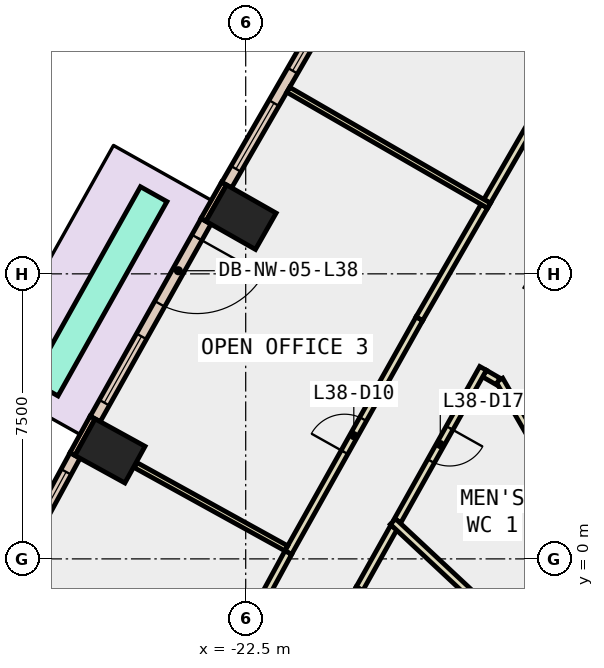
"""IFC4 building model, lengths in metres.
Left out: names, types, materials, properties, quantities, classifications, styles, units other than length and angle.
Written with IfcOpenShell. Run it as: python <this file> out.ifc"""

import sys

from ifc_helpers import new_model, si_unit, direction, frame, frame_2d, origin, origin_2d, place, context, subcontext, project, spatial, rectangle, extrude, element, fill, save


model = new_model("IFC4")
c1 = context("Model", 3, precision=1e-05, world=origin(), true_north=direction((0.0, 1.0)))
c2 = subcontext(c1, "Body", "Model", "MODEL_VIEW")
j1 = project(units=[si_unit("LENGTHUNIT", "METRE"), si_unit("PLANEANGLEUNIT", "RADIAN")], contexts=[c1])
p1 = place(None, origin())
s1 = spatial("IfcSite", under=j1, at=p1, CompositionType="ELEMENT")
p2 = place(p1, origin())
s2 = spatial("IfcBuilding", under=s1, at=p2, CompositionType="ELEMENT")
p3 = place(p2, frame((0.0, 0.0, 171.8)))
s3 = spatial("IfcBuildingStorey", under=s2, at=p3, CompositionType="ELEMENT", Elevation=171.8)
for number, where, z_axis, x_axis in (
    (1, (-22.623, 8.991, -0.4), (0.0, 0.0, 1.0), (0.494, 0.869, 0.0)),
    (2, (-26.071, 2.841, -0.4), (0.0, 0.0, 1.0), (0.482, 0.876, 0.0)),
):
    element("IfcColumn", number, at=place(p3, frame(where, z_axis=z_axis, x_axis=x_axis)), inside=s3, PredefinedType="COLUMN", context=c2, shape_type="SweptSolid", body=[
        extrude(rectangle(XDim=1.1, YDim=1.5, at=origin_2d()), origin(), (0.0, 0.0, 1.0), 4.2),
    ])
p4 = place(p3, frame((-23.069, 9.877, 0.0), z_axis=(0.0, 0.0, 1.0), x_axis=(-0.494512685492, -0.869170411305, 0.0)))
e3 = element("IfcWall", 3, at=p4, inside=s3, PredefinedType="STANDARD", context=c2, shape_type="SweptSolid", body=[
    extrude(rectangle(XDim=1.1, YDim=0.15, at=frame_2d((0.55, 0.0))), origin(), (0.0, 0.0, 1.0), 3.8),
])
p5 = place(p3, frame((-26.529, 3.721, 0.0), z_axis=(0.0, 0.0, 1.0), x_axis=(-0.481850587491, -0.876253394478, 0.0)))
e4 = element("IfcWall", 4, at=p5, inside=s3, PredefinedType="STANDARD", context=c2, shape_type="SweptSolid", body=[
    extrude(rectangle(XDim=1.1, YDim=0.15, at=frame_2d((0.55, 0.0))), origin(), (0.0, 0.0, 1.0), 3.8),
])
p6 = place(p3, frame((-20.02, 15.002, 0.0), z_axis=(0.0, 0.0, 1.0), x_axis=(-0.49986421087, -0.866103787482, 0.0)))
e5 = element("IfcWall", 5, at=p6, inside=s3, PredefinedType="STANDARD", context=c2, shape_type="SweptSolid", body=[
    extrude(rectangle(XDim=5.964, YDim=0.3, at=frame_2d((2.982, 0.0))), origin(), (0.0, 0.0, 1.0), 3.8),
])
p7 = place(p6, frame((0.491, 0.0, 0.9)))
e6 = element("IfcOpeningElement", 6, at=p7, cuts=e5, PredefinedType="OPENING", context=c2, shape_type="SweptSolid", body=[
    extrude(rectangle(XDim=2.0, YDim=2.6, at=frame_2d((1.0, 1.3))), frame((0.0, 0.16, 0.0), z_axis=(0.0, -1.0, 0.0), x_axis=(1.0, 0.0, 0.0)), (0.0, 0.0, 1.0), 0.32),
])
p8 = place(p6, frame((3.473, 0.0, 0.9)))
e7 = element("IfcOpeningElement", 7, at=p8, cuts=e5, PredefinedType="OPENING", context=c2, shape_type="SweptSolid", body=[
    extrude(rectangle(XDim=2.0, YDim=2.6, at=frame_2d((1.0, 1.3))), frame((0.0, 0.16, 0.0), z_axis=(0.0, -1.0, 0.0), x_axis=(1.0, 0.0, 0.0)), (0.0, 0.0, 1.0), 0.32),
])
p9 = place(p3, frame((-23.544, 8.883, 0.0), z_axis=(0.0, 0.0, 1.0), x_axis=(-0.489032196971, -0.87226573378, 0.0)))
e8 = element("IfcWall", 8, at=p9, inside=s3, PredefinedType="STANDARD", context=c2, shape_type="SweptSolid", body=[
    extrude(rectangle(XDim=5.963, YDim=0.3, at=frame_2d((2.981, 0.0))), origin(), (0.0, 0.0, 1.0), 3.8),
])
p10 = place(p9, frame((0.491, 0.0, 0.0)))
e9 = element("IfcOpeningElement", 9, at=p10, cuts=e8, PredefinedType="OPENING", context=c2, shape_type="SweptSolid", body=[
    extrude(rectangle(XDim=2.0, YDim=2.4, at=frame_2d((1.0, 1.2))), frame((0.0, 0.16, 0.0), z_axis=(0.0, -1.0, 0.0), x_axis=(1.0, 0.0, 0.0)), (0.0, 0.0, 1.0), 0.32),
])
p11 = place(p9, frame((3.472, 0.0, 0.9)))
e10 = element("IfcOpeningElement", 10, at=p11, cuts=e8, PredefinedType="OPENING", context=c2, shape_type="SweptSolid", body=[
    extrude(rectangle(XDim=2.0, YDim=2.6, at=frame_2d((1.0, 1.3))), frame((0.0, 0.16, 0.0), z_axis=(0.0, -1.0, 0.0), x_axis=(1.0, 0.0, 0.0)), (0.0, 0.0, 1.0), 0.32),
])
p12 = place(p3, frame((-26.991, 2.72, 0.0), z_axis=(0.0, 0.0, 1.0), x_axis=(-0.477555226268, -0.878601733361, 0.0)))
e11 = element("IfcWall", 11, at=p12, inside=s3, PredefinedType="STANDARD", context=c2, shape_type="SweptSolid", body=[
    extrude(rectangle(XDim=5.964, YDim=0.3, at=frame_2d((2.982, 0.0))), origin(), (0.0, 0.0, 1.0), 3.8),
])
p13 = place(p12, frame((0.491, 0.0, 0.9)))
e12 = element("IfcOpeningElement", 12, at=p13, cuts=e11, PredefinedType="OPENING", context=c2, shape_type="SweptSolid", body=[
    extrude(rectangle(XDim=2.0, YDim=2.6, at=frame_2d((1.0, 1.3))), frame((0.0, 0.16, 0.0), z_axis=(0.0, -1.0, 0.0), x_axis=(1.0, 0.0, 0.0)), (0.0, 0.0, 1.0), 0.32),
])
p14 = place(p12, frame((3.473, 0.0, 0.9)))
e13 = element("IfcOpeningElement", 13, at=p14, cuts=e11, PredefinedType="OPENING", context=c2, shape_type="SweptSolid", body=[
    extrude(rectangle(XDim=2.0, YDim=2.6, at=frame_2d((1.0, 1.3))), frame((0.0, 0.16, 0.0), z_axis=(0.0, -1.0, 0.0), x_axis=(1.0, 0.0, 0.0)), (0.0, 0.0, 1.0), 0.32),
])
p15 = place(p3, frame((-24.921, 9.597, 0.0), z_axis=(0.0, 0.0, 1.0), x_axis=(-0.489036967821, -0.872263059005, 0.0)))
e14 = element("IfcWall", 14, at=p15, inside=s3, PredefinedType="STANDARD", context=c2, shape_type="SweptSolid", body=[
    extrude(rectangle(XDim=5.863, YDim=0.8, at=frame_2d((2.932, 0.0))), origin(), (0.0, 0.0, 1.0), 0.8),
])
p16 = place(p3, frame((-14.154, 1.815, 0.0), z_axis=(0.0, 0.0, 1.0), x_axis=(-0.500038857296, 0.866002968352, 0.0)))
e15 = element("IfcWall", 15, at=p16, inside=s3, PredefinedType="PARTITIONING", context=c2, shape_type="SweptSolid", body=[
    extrude(rectangle(XDim=3.34, YDim=0.2, at=frame_2d((1.67, 0.0))), origin(), (0.0, 0.0, 1.0), 3.8),
])
p17 = place(p3, frame((-15.86, 4.671, 0.0), z_axis=(0.0, 0.0, 1.0), x_axis=(-0.866047486323, 0.49996174997, 0.0)))
e16 = element("IfcWall", 16, at=p17, inside=s3, PredefinedType="PARTITIONING", context=c2, shape_type="SweptSolid", body=[
    extrude(rectangle(XDim=0.412, YDim=0.2, at=frame_2d((0.206, 0.0))), origin(), (0.0, 0.0, 1.0), 3.8),
])
p18 = place(p3, frame((-16.255, 5.014, 0.0), z_axis=(0.0, 0.0, 1.0), x_axis=(-0.488988017817, -0.87229050117, 0.0)))
e17 = element("IfcWall", 17, at=p18, inside=s3, PredefinedType="PARTITIONING", context=c2, shape_type="SweptSolid", body=[
    extrude(rectangle(XDim=4.599, YDim=0.2, at=frame_2d((2.3, 0.0))), origin(), (0.0, 0.0, 1.0), 3.8),
])
p19 = place(p18, frame((1.8, 0.0, 0.0)))
e18 = element("IfcOpeningElement", 18, at=p19, cuts=e17, PredefinedType="OPENING", context=c2, shape_type="SweptSolid", body=[
    extrude(rectangle(XDim=1.0, YDim=2.1, at=frame_2d((0.5, 1.05))), frame((0.0, 0.11, 0.0), z_axis=(0.0, -1.0, 0.0), x_axis=(1.0, 0.0, 0.0)), (0.0, 0.0, 1.0), 0.22),
])
p20 = place(p3, frame((-18.602, 0.828, 0.0), z_axis=(0.0, 0.0, 1.0), x_axis=(-0.488969229043, -0.872301033502, 0.0)))
e19 = element("IfcWall", 19, at=p20, inside=s3, PredefinedType="PARTITIONING", context=c2, shape_type="SweptSolid", body=[
    extrude(rectangle(XDim=1.849, YDim=0.2, at=frame_2d((0.924, 0.0))), origin(), (0.0, 0.0, 1.0), 3.8),
])
p21 = place(p3, frame((-19.506, -0.785, 0.0), z_axis=(0.0, 0.0, 1.0), x_axis=(-0.477513909405, -0.878624189472, 0.0)))
e20 = element("IfcWall", 20, at=p21, inside=s3, PredefinedType="PARTITIONING", context=c2, shape_type="SweptSolid", body=[
    extrude(rectangle(XDim=6.956, YDim=0.2, at=frame_2d((3.478, 0.0))), origin(), (0.0, 0.0, 1.0), 3.8),
])
p22 = place(p21, frame((2.978, 0.0, 0.0)))
e21 = element("IfcOpeningElement", 21, at=p22, cuts=e20, PredefinedType="OPENING", context=c2, shape_type="SweptSolid", body=[
    extrude(rectangle(XDim=1.0, YDim=2.1, at=frame_2d((0.5, 1.05))), frame((0.0, 0.11, 0.0), z_axis=(0.0, -1.0, 0.0), x_axis=(1.0, 0.0, 0.0)), (0.0, 0.0, 1.0), 0.22),
])
p23 = place(p3, frame((-16.147, 9.41, 0.0), z_axis=(0.0, 0.0, 1.0), x_axis=(0.500044178772, 0.865999895656, 0.0)))
e22 = element("IfcWall", 22, at=p23, inside=s3, PredefinedType="PARTITIONING", context=c2, shape_type="SweptSolid", body=[
    extrude(rectangle(XDim=3.416, YDim=0.2, at=frame_2d((1.708, 0.0))), origin(), (0.0, 0.0, 1.0), 3.8),
])
p24 = place(p3, frame((-21.381, 0.165, 0.0), z_axis=(0.0, 0.0, 1.0), x_axis=(0.489014139272, 0.872275857509, 0.0)))
e23 = element("IfcWall", 23, at=p24, inside=s3, PredefinedType="PARTITIONING", context=c2, shape_type="SweptSolid", body=[
    extrude(rectangle(XDim=7.057, YDim=0.2, at=frame_2d((3.529, 0.0))), origin(), (0.0, 0.0, 1.0), 3.8),
])
p25 = place(p24, frame((3.029, 0.0, 0.0)))
e24 = element("IfcOpeningElement", 24, at=p25, cuts=e23, PredefinedType="OPENING", context=c2, shape_type="SweptSolid", body=[
    extrude(rectangle(XDim=1.0, YDim=2.1, at=frame_2d((0.5, 1.05))), frame((0.0, 0.11, 0.0), z_axis=(0.0, -1.0, 0.0), x_axis=(1.0, 0.0, 0.0)), (0.0, 0.0, 1.0), 0.22),
])
p26 = place(p3, frame((-17.93, 6.321, 0.0), z_axis=(0.0, 0.0, 1.0), x_axis=(0.499920397431, 0.866071357471, 0.0)))
e25 = element("IfcWall", 25, at=p26, inside=s3, PredefinedType="PARTITIONING", context=c2, shape_type="SweptSolid", body=[
    extrude(rectangle(XDim=3.417, YDim=0.2, at=frame_2d((1.708, 0.0))), origin(), (0.0, 0.0, 1.0), 3.8),
])
p27 = place(p3, frame((-24.68, -5.906, 0.0), z_axis=(0.0, 0.0, 1.0), x_axis=(0.47757676389, 0.878590026459, 0.0)))
e26 = element("IfcWall", 26, at=p27, inside=s3, PredefinedType="PARTITIONING", context=c2, shape_type="SweptSolid", body=[
    extrude(rectangle(XDim=6.91, YDim=0.2, at=frame_2d((3.455, 0.0))), origin(), (0.0, 0.0, 1.0), 3.8),
])
p28 = place(p27, frame((3.029, 0.0, 0.0)))
e27 = element("IfcOpeningElement", 27, at=p28, cuts=e26, PredefinedType="OPENING", context=c2, shape_type="SweptSolid", body=[
    extrude(rectangle(XDim=1.0, YDim=2.1, at=frame_2d((0.5, 1.05))), frame((0.0, 0.11, 0.0), z_axis=(0.0, -1.0, 0.0), x_axis=(1.0, 0.0, 0.0)), (0.0, 0.0, 1.0), 0.22),
])
p29 = place(p3, frame((-11.372, -5.79, 0.0), z_axis=(0.0, 0.0, 1.0), x_axis=(-0.730922728623, 0.682460229451, 0.0)))
e28 = element("IfcWall", 28, at=p29, inside=s3, PredefinedType="PARTITIONING", context=c2, shape_type="SweptSolid", body=[
    extrude(rectangle(XDim=9.924, YDim=0.2, at=frame_2d((4.962, 0.0))), origin(), (0.0, 0.0, 1.0), 3.8),
])
p30 = place(p3, frame((-16.098, 9.295, 0.0), z_axis=(0.0, 0.0, 1.0), x_axis=(-0.866109615698, 0.499854112313, 0.0)))
e29 = element("IfcWall", 29, at=p30, inside=s3, PredefinedType="PARTITIONING", context=c2, shape_type="SweptSolid", body=[
    extrude(rectangle(XDim=6.1, YDim=0.15, at=frame_2d((3.05, 0.0))), origin(), (0.0, 0.0, 1.0), 3.8),
])
p31 = place(p3, frame((-21.432, 0.278, 0.0), z_axis=(0.0, 0.0, 1.0), x_axis=(-0.875412579047, 0.483376474857, 0.0)))
e30 = element("IfcWall", 30, at=p31, inside=s3, PredefinedType="PARTITIONING", context=c2, shape_type="SweptSolid", body=[
    extrude(rectangle(XDim=4.531, YDim=0.15, at=frame_2d((2.265, 0.0))), origin(), (0.0, 0.0, 1.0), 3.8),
])
p32 = place(p7, origin())
e31 = element("IfcWindow", 31, at=p32, inside=s3, PartitioningType="SINGLE_PANEL", PredefinedType="WINDOW", context=c2, shape_type="SweptSolid", body=[
    extrude(rectangle(XDim=2.0, YDim=2.6, at=frame_2d((1.0, 1.3))), frame((0.0, 0.03, 0.0), z_axis=(0.0, -1.0, 0.0), x_axis=(1.0, 0.0, 0.0)), (0.0, 0.0, 1.0), 0.06),
])
fill(e6, e31)
p33 = place(p8, origin())
e32 = element("IfcWindow", 32, at=p33, inside=s3, PartitioningType="SINGLE_PANEL", PredefinedType="WINDOW", context=c2, shape_type="SweptSolid", body=[
    extrude(rectangle(XDim=2.0, YDim=2.6, at=frame_2d((1.0, 1.3))), frame((0.0, 0.03, 0.0), z_axis=(0.0, -1.0, 0.0), x_axis=(1.0, 0.0, 0.0)), (0.0, 0.0, 1.0), 0.06),
])
fill(e7, e32)
p34 = place(p10, origin())
e33 = element("IfcDoor", 33, at=p34, inside=s3, OperationType="SLIDING_TO_LEFT", PredefinedType="DOOR", context=c2, shape_type="SweptSolid", body=[
    extrude(rectangle(XDim=2.0, YDim=2.4, at=frame_2d((1.0, 1.2))), frame((0.0, 0.025, 0.0), z_axis=(0.0, -1.0, 0.0), x_axis=(1.0, 0.0, 0.0)), (0.0, 0.0, 1.0), 0.05),
])
fill(e9, e33)
p35 = place(p11, origin())
e34 = element("IfcWindow", 34, at=p35, inside=s3, PartitioningType="SINGLE_PANEL", PredefinedType="WINDOW", context=c2, shape_type="SweptSolid", body=[
    extrude(rectangle(XDim=2.0, YDim=2.6, at=frame_2d((1.0, 1.3))), frame((0.0, 0.03, 0.0), z_axis=(0.0, -1.0, 0.0), x_axis=(1.0, 0.0, 0.0)), (0.0, 0.0, 1.0), 0.06),
])
fill(e10, e34)
p36 = place(p13, origin())
e35 = element("IfcWindow", 35, at=p36, inside=s3, PartitioningType="SINGLE_PANEL", PredefinedType="WINDOW", context=c2, shape_type="SweptSolid", body=[
    extrude(rectangle(XDim=2.0, YDim=2.6, at=frame_2d((1.0, 1.3))), frame((0.0, 0.03, 0.0), z_axis=(0.0, -1.0, 0.0), x_axis=(1.0, 0.0, 0.0)), (0.0, 0.0, 1.0), 0.06),
])
fill(e12, e35)
p37 = place(p25, origin())
e36 = element("IfcDoor", 36, at=p37, inside=s3, OperationType="SINGLE_SWING_RIGHT", PredefinedType="DOOR", context=c2, shape_type="SweptSolid", body=[
    extrude(rectangle(XDim=1.0, YDim=2.1, at=frame_2d((0.5, 1.05))), frame((0.0, 0.025, 0.0), z_axis=(0.0, -1.0, 0.0), x_axis=(1.0, 0.0, 0.0)), (0.0, 0.0, 1.0), 0.05),
])
fill(e24, e36)
p38 = place(p19, origin())
e37 = element("IfcDoor", 37, at=p38, inside=s3, OperationType="SINGLE_SWING_LEFT", PredefinedType="DOOR", context=c2, shape_type="SweptSolid", body=[
    extrude(rectangle(XDim=1.0, YDim=2.1, at=frame_2d((0.5, 1.05))), frame((0.0, 0.025, 0.0), z_axis=(0.0, -1.0, 0.0), x_axis=(1.0, 0.0, 0.0)), (0.0, 0.0, 1.0), 0.05),
])
fill(e18, e37)
save(model, sys.argv[1])
